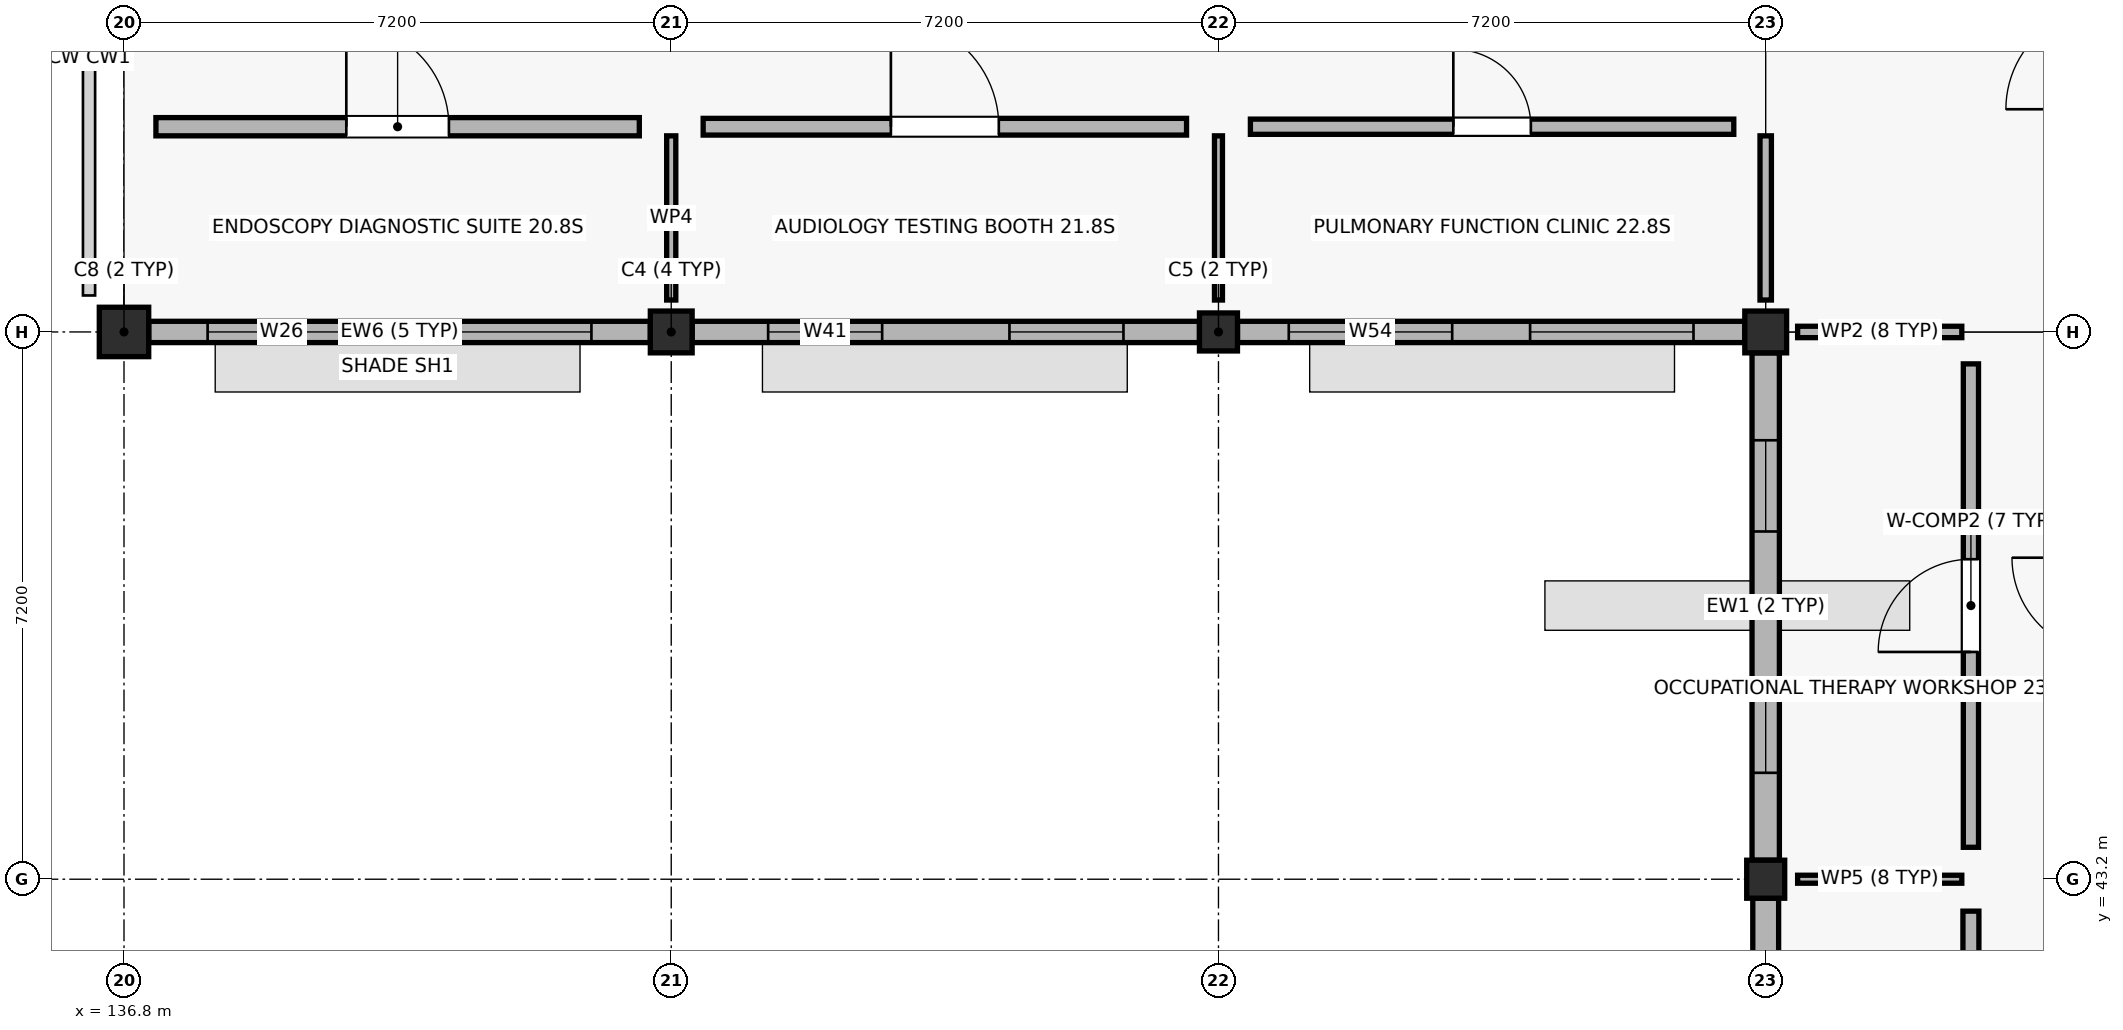
"""IFC4 building model, lengths in metres.
Left out: names, types, materials, properties, quantities, classifications, styles, units other than length and angle.
Written with IfcOpenShell. Run it as: python <this file> out.ifc"""

import sys

from ifc_helpers import new_model, si_unit, direction, frame, frame_2d, origin, origin_2d, place, context, subcontext, project, spatial, rectangle, circle, extrude, element, fill, save


model = new_model("IFC4")
c1 = context("Model", 3, precision=1e-05, world=origin(), true_north=direction((0.0, 1.0)))
c2 = subcontext(c1, "Body", "Model", "MODEL_VIEW")
j1 = project(units=[si_unit("LENGTHUNIT", "METRE"), si_unit("PLANEANGLEUNIT", "RADIAN")], contexts=[c1])
p1 = place(None, origin())
s1 = spatial("IfcSite", under=j1, at=p1, CompositionType="ELEMENT")
p2 = place(p1, origin())
s2 = spatial("IfcBuilding", under=s1, at=p2, CompositionType="ELEMENT")
p3 = place(p2, frame((0.0, 0.0, 4.5)))
s3 = spatial("IfcBuildingStorey", under=s2, at=p3, CompositionType="ELEMENT", Elevation=4.5)
p4 = place(p3, frame((136.8, 50.4, 0.0), z_axis=(0.0, 0.0, 1.0), x_axis=(1.0, 0.0, 0.0)))
e1 = element("IfcColumn", 1, at=p4, inside=s3, PredefinedType="COLUMN", context=c2, shape_type="SweptSolid", body=[
    extrude(circle(Radius=0.325, at=origin_2d()), origin(), (0.0, 0.0, 1.0), 4.5),
])
p5 = place(p3, frame((144.0, 50.4, 0.0), z_axis=(0.0, 0.0, 1.0), x_axis=(1.0, 0.0, 0.0)))
e2 = element("IfcColumn", 2, at=p5, inside=s3, PredefinedType="COLUMN", context=c2, shape_type="SweptSolid", body=[
    extrude(rectangle(XDim=0.55, YDim=0.55, at=origin_2d()), origin(), (0.0, 0.0, 1.0), 4.5),
])
for number, where, z_axis, x_axis in (
    (3, (151.2, 50.4, 0.0), (0.0, 0.0, 1.0), (1.0, 0.0, 0.0)),
    (4, (158.4, 43.2, 0.0), (0.0, 0.0, 1.0), (1.0, 0.0, 0.0)),
):
    element("IfcColumn", number, at=place(p3, frame(where, z_axis=z_axis, x_axis=x_axis)), inside=s3, PredefinedType="COLUMN", context=c2, shape_type="SweptSolid", body=[
        extrude(rectangle(XDim=0.5, YDim=0.5, at=origin_2d()), origin(), (0.0, 0.0, 1.0), 4.28),
    ])
p6 = place(p3, frame((158.4, 50.4, 0.0), z_axis=(0.0, 0.0, 1.0), x_axis=(1.0, 0.0, 0.0)))
e5 = element("IfcColumn", 5, at=p6, inside=s3, PredefinedType="COLUMN", context=c2, shape_type="SweptSolid", body=[
    extrude(rectangle(XDim=0.55, YDim=0.55, at=origin_2d()), origin(), (0.0, 0.0, 1.0), 4.28),
])
p7 = place(p3, frame((137.125, 50.4, 0.0), z_axis=(0.0, 0.0, 1.0), x_axis=(1.0, 0.0, 0.0)))
e6 = element("IfcWall", 6, at=p7, inside=s3, PredefinedType="STANDARD", context=c2, shape_type="SweptSolid", body=[
    extrude(rectangle(XDim=6.6, YDim=0.28, at=frame_2d((3.3, 0.0))), origin(), (0.0, 0.0, 1.0), 3.47),
])
p8 = place(p7, frame((0.775, 0.0, 0.9)))
e7 = element("IfcOpeningElement", 7, at=p8, cuts=e6, PredefinedType="OPENING", context=c2, shape_type="SweptSolid", body=[
    extrude(rectangle(XDim=1.95, YDim=1.5, at=frame_2d((0.975, 0.75))), frame((0.0, 0.15, 0.0), z_axis=(0.0, -1.0, 0.0), x_axis=(1.0, 0.0, 0.0)), (0.0, 0.0, 1.0), 0.3),
])
p9 = place(p7, frame((3.875, 0.0, 0.9)))
e8 = element("IfcOpeningElement", 8, at=p9, cuts=e6, PredefinedType="OPENING", context=c2, shape_type="SweptSolid", body=[
    extrude(rectangle(XDim=1.95, YDim=1.5, at=frame_2d((0.975, 0.75))), frame((0.0, 0.15, 0.0), z_axis=(0.0, -1.0, 0.0), x_axis=(1.0, 0.0, 0.0)), (0.0, 0.0, 1.0), 0.3),
])
p10 = place(p3, frame((144.275, 50.4, 0.0), z_axis=(0.0, 0.0, 1.0), x_axis=(1.0, 0.0, 0.0)))
e9 = element("IfcWall", 9, at=p10, inside=s3, PredefinedType="STANDARD", context=c2, shape_type="SweptSolid", body=[
    extrude(rectangle(XDim=6.675, YDim=0.28, at=frame_2d((3.337, 0.0))), origin(), (0.0, 0.0, 1.0), 3.47),
])
p11 = place(p10, frame((1.0, 0.0, 0.9)))
e10 = element("IfcOpeningElement", 10, at=p11, cuts=e9, PredefinedType="OPENING", context=c2, shape_type="SweptSolid", body=[
    extrude(rectangle(XDim=1.5, YDim=1.75, at=frame_2d((0.75, 0.875))), frame((0.0, 0.15, 0.0), z_axis=(0.0, -1.0, 0.0), x_axis=(1.0, 0.0, 0.0)), (0.0, 0.0, 1.0), 0.3),
])
p12 = place(p10, frame((4.175, 0.0, 0.9)))
e11 = element("IfcOpeningElement", 11, at=p12, cuts=e9, PredefinedType="OPENING", context=c2, shape_type="SweptSolid", body=[
    extrude(rectangle(XDim=1.5, YDim=1.75, at=frame_2d((0.75, 0.875))), frame((0.0, 0.15, 0.0), z_axis=(0.0, -1.0, 0.0), x_axis=(1.0, 0.0, 0.0)), (0.0, 0.0, 1.0), 0.3),
])
p13 = place(p3, frame((151.45, 50.4, 0.0), z_axis=(0.0, 0.0, 1.0), x_axis=(1.0, 0.0, 0.0)))
e12 = element("IfcWall", 12, at=p13, inside=s3, PredefinedType="STANDARD", context=c2, shape_type="SweptSolid", body=[
    extrude(rectangle(XDim=6.675, YDim=0.28, at=frame_2d((3.337, 0.0))), origin(), (0.0, 0.0, 1.0), 3.47),
])
p14 = place(p13, frame((0.675, 0.0, 0.9)))
e13 = element("IfcOpeningElement", 13, at=p14, cuts=e12, PredefinedType="OPENING", context=c2, shape_type="SweptSolid", body=[
    extrude(rectangle(XDim=2.15, YDim=1.88, at=frame_2d((1.075, 0.94))), frame((0.0, 0.15, 0.0), z_axis=(0.0, -1.0, 0.0), x_axis=(1.0, 0.0, 0.0)), (0.0, 0.0, 1.0), 0.3),
])
p15 = place(p13, frame((3.85, 0.0, 0.9)))
e14 = element("IfcOpeningElement", 14, at=p15, cuts=e12, PredefinedType="OPENING", context=c2, shape_type="SweptSolid", body=[
    extrude(rectangle(XDim=2.15, YDim=1.88, at=frame_2d((1.075, 0.94))), frame((0.0, 0.15, 0.0), z_axis=(0.0, -1.0, 0.0), x_axis=(1.0, 0.0, 0.0)), (0.0, 0.0, 1.0), 0.3),
])
p16 = place(p3, frame((158.4, 42.95, 0.0), z_axis=(0.0, 0.0, 1.0), x_axis=(0.0, -1.0, 0.0)))
e15 = element("IfcWall", 15, at=p16, inside=s3, PredefinedType="SOLIDWALL", context=c2, shape_type="SweptSolid", body=[
    extrude(rectangle(XDim=6.725, YDim=0.34, at=frame_2d((3.362, 0.0))), origin(), (0.0, 0.0, 1.0), 3.52),
])
p17 = place(p16, frame((0.85, 0.0, 0.9)))
e16 = element("IfcOpeningElement", 16, at=p17, cuts=e15, PredefinedType="OPENING", context=c2, shape_type="SweptSolid", body=[
    extrude(rectangle(XDim=1.8, YDim=1.5, at=frame_2d((0.9, 0.75))), frame((0.0, 0.18, 0.0), z_axis=(0.0, -1.0, 0.0), x_axis=(1.0, 0.0, 0.0)), (0.0, 0.0, 1.0), 0.36),
])
p18 = place(p16, frame((4.075, 0.0, 0.9)))
e17 = element("IfcOpeningElement", 17, at=p18, cuts=e15, PredefinedType="OPENING", context=c2, shape_type="SweptSolid", body=[
    extrude(rectangle(XDim=1.8, YDim=1.5, at=frame_2d((0.9, 0.75))), frame((0.0, 0.18, 0.0), z_axis=(0.0, -1.0, 0.0), x_axis=(1.0, 0.0, 0.0)), (0.0, 0.0, 1.0), 0.36),
])
p19 = place(p3, frame((158.4, 50.125, 0.0), z_axis=(0.0, 0.0, 1.0), x_axis=(0.0, -1.0, 0.0)))
e18 = element("IfcWall", 18, at=p19, inside=s3, PredefinedType="SOLIDWALL", context=c2, shape_type="SweptSolid", body=[
    extrude(rectangle(XDim=6.675, YDim=0.36, at=frame_2d((3.337, 0.0))), origin(), (0.0, 0.0, 1.0), 3.52),
])
p20 = place(p19, frame((1.15, 0.0, 0.9)))
e19 = element("IfcOpeningElement", 19, at=p20, cuts=e18, PredefinedType="OPENING", context=c2, shape_type="SweptSolid", body=[
    extrude(rectangle(XDim=1.2, YDim=1.62, at=frame_2d((0.6, 0.81))), frame((0.0, 0.19, 0.0), z_axis=(0.0, -1.0, 0.0), x_axis=(1.0, 0.0, 0.0)), (0.0, 0.0, 1.0), 0.38),
])
p21 = place(p19, frame((4.325, 0.0, 0.9)))
e20 = element("IfcOpeningElement", 20, at=p21, cuts=e18, PredefinedType="OPENING", context=c2, shape_type="SweptSolid", body=[
    extrude(rectangle(XDim=1.2, YDim=1.62, at=frame_2d((0.6, 0.81))), frame((0.0, 0.19, 0.0), z_axis=(0.0, -1.0, 0.0), x_axis=(1.0, 0.0, 0.0)), (0.0, 0.0, 1.0), 0.38),
])
p22 = place(p3, frame((161.1, 36.42, 0.0), z_axis=(0.0, 0.0, 1.0), x_axis=(0.0, 1.0, 0.0)))
e21 = element("IfcWall", 21, at=p22, inside=s3, PredefinedType="PLUMBINGWALL", context=c2, shape_type="SweptSolid", body=[
    extrude(rectangle(XDim=6.36, YDim=0.21, at=frame_2d((3.18, 0.0))), origin(), (0.0, 0.0, 1.0), 3.36),
])
p23 = place(p22, frame((2.61, 0.0, 0.0)))
e22 = element("IfcOpeningElement", 22, at=p23, cuts=e21, PredefinedType="OPENING", context=c2, shape_type="SweptSolid", body=[
    extrude(rectangle(XDim=1.14, YDim=2.14, at=frame_2d((0.57, 1.07))), frame((0.0, 0.115, 0.0), z_axis=(0.0, -1.0, 0.0), x_axis=(1.0, 0.0, 0.0)), (0.0, 0.0, 1.0), 0.23),
])
p24 = place(p3, frame((158.82, 43.2, 0.0), z_axis=(0.0, 0.0, 1.0), x_axis=(1.0, 0.0, 0.0)))
e23 = element("IfcWall", 23, at=p24, inside=s3, PredefinedType="PARTITIONING", context=c2, shape_type="SweptSolid", body=[
    extrude(rectangle(XDim=2.16, YDim=0.105, at=frame_2d((1.08, 0.0))), origin(), (0.0, 0.0, 1.0), 3.36),
])
p25 = place(p3, frame((161.1, 43.62, 0.0), z_axis=(0.0, 0.0, 1.0), x_axis=(0.0, 1.0, 0.0)))
e24 = element("IfcWall", 24, at=p25, inside=s3, PredefinedType="SOLIDWALL", context=c2, shape_type="SweptSolid", body=[
    extrude(rectangle(XDim=6.36, YDim=0.2, at=frame_2d((3.18, 0.0))), origin(), (0.0, 0.0, 1.0), 3.36),
])
p26 = place(p25, frame((2.57, 0.0, 0.0)))
e25 = element("IfcOpeningElement", 25, at=p26, cuts=e24, PredefinedType="OPENING", context=c2, shape_type="SweptSolid", body=[
    extrude(rectangle(XDim=1.22, YDim=2.14, at=frame_2d((0.61, 1.07))), frame((0.0, 0.11, 0.0), z_axis=(0.0, -1.0, 0.0), x_axis=(1.0, 0.0, 0.0)), (0.0, 0.0, 1.0), 0.22),
])
p27 = place(p3, frame((158.82, 50.4, 0.0), z_axis=(0.0, 0.0, 1.0), x_axis=(1.0, 0.0, 0.0)))
e26 = element("IfcWall", 26, at=p27, inside=s3, PredefinedType="PARTITIONING", context=c2, shape_type="SweptSolid", body=[
    extrude(rectangle(XDim=2.16, YDim=0.15, at=frame_2d((1.08, 0.0))), origin(), (0.0, 0.0, 1.0), 3.36),
])
p28 = place(p3, frame((137.22, 53.1, 0.0), z_axis=(0.0, 0.0, 1.0), x_axis=(1.0, 0.0, 0.0)))
e27 = element("IfcWall", 27, at=p28, inside=s3, PredefinedType="SOLIDWALL", context=c2, shape_type="SweptSolid", body=[
    extrude(rectangle(XDim=6.36, YDim=0.24, at=frame_2d((3.18, 0.0))), origin(), (0.0, 0.0, 1.0), 3.36),
])
p29 = place(p28, frame((2.505, 0.0, 0.0)))
e28 = element("IfcOpeningElement", 28, at=p29, cuts=e27, PredefinedType="OPENING", context=c2, shape_type="SweptSolid", body=[
    extrude(rectangle(XDim=1.35, YDim=2.2, at=frame_2d((0.675, 1.1))), frame((0.0, 0.13, 0.0), z_axis=(0.0, -1.0, 0.0), x_axis=(1.0, 0.0, 0.0)), (0.0, 0.0, 1.0), 0.26),
])
p30 = place(p3, frame((144.0, 50.82, 0.0), z_axis=(0.0, 0.0, 1.0), x_axis=(0.0, 1.0, 0.0)))
e29 = element("IfcWall", 29, at=p30, inside=s3, PredefinedType="PARTITIONING", context=c2, shape_type="SweptSolid", body=[
    extrude(rectangle(XDim=2.16, YDim=0.12, at=frame_2d((1.08, 0.0))), origin(), (0.0, 0.0, 1.0), 3.36),
])
p31 = place(p3, frame((144.42, 53.1, 0.0), z_axis=(0.0, 0.0, 1.0), x_axis=(1.0, 0.0, 0.0)))
e30 = element("IfcWall", 30, at=p31, inside=s3, PredefinedType="SOLIDWALL", context=c2, shape_type="SweptSolid", body=[
    extrude(rectangle(XDim=6.36, YDim=0.22, at=frame_2d((3.18, 0.0))), origin(), (0.0, 0.0, 1.0), 3.36),
])
p32 = place(p31, frame((2.47, 0.0, 0.0)))
e31 = element("IfcOpeningElement", 31, at=p32, cuts=e30, PredefinedType="OPENING", context=c2, shape_type="SweptSolid", body=[
    extrude(rectangle(XDim=1.42, YDim=2.14, at=frame_2d((0.71, 1.07))), frame((0.0, 0.12, 0.0), z_axis=(0.0, -1.0, 0.0), x_axis=(1.0, 0.0, 0.0)), (0.0, 0.0, 1.0), 0.24),
])
p33 = place(p3, frame((151.2, 50.82, 0.0), z_axis=(0.0, 0.0, 1.0), x_axis=(0.0, 1.0, 0.0)))
e32 = element("IfcWall", 32, at=p33, inside=s3, PredefinedType="PARTITIONING", context=c2, shape_type="SweptSolid", body=[
    extrude(rectangle(XDim=2.16, YDim=0.105, at=frame_2d((1.08, 0.0))), origin(), (0.0, 0.0, 1.0), 3.36),
])
p34 = place(p3, frame((151.62, 53.1, 0.0), z_axis=(0.0, 0.0, 1.0), x_axis=(1.0, 0.0, 0.0)))
e33 = element("IfcWall", 33, at=p34, inside=s3, PredefinedType="SOLIDWALL", context=c2, shape_type="SweptSolid", body=[
    extrude(rectangle(XDim=6.36, YDim=0.2, at=frame_2d((3.18, 0.0))), origin(), (0.0, 0.0, 1.0), 3.36),
])
p35 = place(p34, frame((2.67, 0.0, 0.0)))
e34 = element("IfcOpeningElement", 34, at=p35, cuts=e33, PredefinedType="OPENING", context=c2, shape_type="SweptSolid", body=[
    extrude(rectangle(XDim=1.02, YDim=2.19, at=frame_2d((0.51, 1.095))), frame((0.0, 0.11, 0.0), z_axis=(0.0, -1.0, 0.0), x_axis=(1.0, 0.0, 0.0)), (0.0, 0.0, 1.0), 0.22),
])
p36 = place(p3, frame((158.4, 50.82, 0.0), z_axis=(0.0, 0.0, 1.0), x_axis=(0.0, 1.0, 0.0)))
e35 = element("IfcWall", 35, at=p36, inside=s3, PredefinedType="PARTITIONING", context=c2, shape_type="SweptSolid", body=[
    extrude(rectangle(XDim=2.16, YDim=0.15, at=frame_2d((1.08, 0.0))), origin(), (0.0, 0.0, 1.0), 3.36),
])
p37 = place(p8, origin())
e36 = element("IfcWindow", 36, at=p37, inside=s3, PartitioningType="SINGLE_PANEL", PredefinedType="WINDOW", context=c2, shape_type="SweptSolid", body=[
    extrude(rectangle(XDim=1.95, YDim=1.5, at=frame_2d((0.975, 0.75))), frame((0.0, 0.03, 0.0), z_axis=(0.0, -1.0, 0.0), x_axis=(1.0, 0.0, 0.0)), (0.0, 0.0, 1.0), 0.06),
])
fill(e7, e36)
p38 = place(p9, origin())
e37 = element("IfcWindow", 37, at=p38, inside=s3, PartitioningType="SINGLE_PANEL", PredefinedType="WINDOW", context=c2, shape_type="SweptSolid", body=[
    extrude(rectangle(XDim=1.95, YDim=1.5, at=frame_2d((0.975, 0.75))), frame((0.0, 0.03, 0.0), z_axis=(0.0, -1.0, 0.0), x_axis=(1.0, 0.0, 0.0)), (0.0, 0.0, 1.0), 0.06),
])
fill(e8, e37)
p39 = place(p11, origin())
e38 = element("IfcWindow", 38, at=p39, inside=s3, PartitioningType="SINGLE_PANEL", PredefinedType="WINDOW", context=c2, shape_type="SweptSolid", body=[
    extrude(rectangle(XDim=1.5, YDim=1.75, at=frame_2d((0.75, 0.875))), frame((0.0, 0.03, 0.0), z_axis=(0.0, -1.0, 0.0), x_axis=(1.0, 0.0, 0.0)), (0.0, 0.0, 1.0), 0.06),
])
fill(e10, e38)
p40 = place(p12, origin())
e39 = element("IfcWindow", 39, at=p40, inside=s3, PartitioningType="SINGLE_PANEL", PredefinedType="WINDOW", context=c2, shape_type="SweptSolid", body=[
    extrude(rectangle(XDim=1.5, YDim=1.75, at=frame_2d((0.75, 0.875))), frame((0.0, 0.03, 0.0), z_axis=(0.0, -1.0, 0.0), x_axis=(1.0, 0.0, 0.0)), (0.0, 0.0, 1.0), 0.06),
])
fill(e11, e39)
p41 = place(p14, origin())
e40 = element("IfcWindow", 40, at=p41, inside=s3, PartitioningType="SINGLE_PANEL", PredefinedType="WINDOW", context=c2, shape_type="SweptSolid", body=[
    extrude(rectangle(XDim=2.15, YDim=1.88, at=frame_2d((1.075, 0.94))), frame((0.0, 0.03, 0.0), z_axis=(0.0, -1.0, 0.0), x_axis=(1.0, 0.0, 0.0)), (0.0, 0.0, 1.0), 0.06),
])
fill(e13, e40)
p42 = place(p15, origin())
e41 = element("IfcWindow", 41, at=p42, inside=s3, PartitioningType="SINGLE_PANEL", PredefinedType="WINDOW", context=c2, shape_type="SweptSolid", body=[
    extrude(rectangle(XDim=2.15, YDim=1.88, at=frame_2d((1.075, 0.94))), frame((0.0, 0.03, 0.0), z_axis=(0.0, -1.0, 0.0), x_axis=(1.0, 0.0, 0.0)), (0.0, 0.0, 1.0), 0.06),
])
fill(e14, e41)
p43 = place(p20, origin())
e42 = element("IfcWindow", 42, at=p43, inside=s3, PartitioningType="SINGLE_PANEL", PredefinedType="WINDOW", context=c2, shape_type="SweptSolid", body=[
    extrude(rectangle(XDim=1.2, YDim=1.62, at=frame_2d((0.6, 0.81))), frame((0.0, 0.03, 0.0), z_axis=(0.0, -1.0, 0.0), x_axis=(1.0, 0.0, 0.0)), (0.0, 0.0, 1.0), 0.06),
])
fill(e19, e42)
p44 = place(p21, origin())
e43 = element("IfcWindow", 43, at=p44, inside=s3, PartitioningType="SINGLE_PANEL", PredefinedType="WINDOW", context=c2, shape_type="SweptSolid", body=[
    extrude(rectangle(XDim=1.2, YDim=1.62, at=frame_2d((0.6, 0.81))), frame((0.0, 0.03, 0.0), z_axis=(0.0, -1.0, 0.0), x_axis=(1.0, 0.0, 0.0)), (0.0, 0.0, 1.0), 0.06),
])
fill(e20, e43)
p45 = place(p26, origin())
e44 = element("IfcDoor", 44, at=p45, inside=s3, OperationType="SINGLE_SWING_LEFT", PredefinedType="DOOR", context=c2, shape_type="SweptSolid", body=[
    extrude(rectangle(XDim=1.22, YDim=2.14, at=frame_2d((0.61, 1.07))), frame((0.0, 0.025, 0.0), z_axis=(0.0, -1.0, 0.0), x_axis=(1.0, 0.0, 0.0)), (0.0, 0.0, 1.0), 0.05),
])
fill(e25, e44)
p46 = place(p29, origin())
e45 = element("IfcDoor", 45, at=p46, inside=s3, OperationType="SINGLE_SWING_LEFT", PredefinedType="DOOR", context=c2, shape_type="SweptSolid", body=[
    extrude(rectangle(XDim=1.35, YDim=2.2, at=frame_2d((0.675, 1.1))), frame((0.0, 0.025, 0.0), z_axis=(0.0, -1.0, 0.0), x_axis=(1.0, 0.0, 0.0)), (0.0, 0.0, 1.0), 0.05),
])
fill(e28, e45)
p47 = place(p32, origin())
e46 = element("IfcDoor", 46, at=p47, inside=s3, OperationType="SINGLE_SWING_LEFT", PredefinedType="DOOR", context=c2, shape_type="SweptSolid", body=[
    extrude(rectangle(XDim=1.42, YDim=2.14, at=frame_2d((0.71, 1.07))), frame((0.0, 0.025, 0.0), z_axis=(0.0, -1.0, 0.0), x_axis=(1.0, 0.0, 0.0)), (0.0, 0.0, 1.0), 0.05),
])
fill(e31, e46)
p48 = place(p35, origin())
e47 = element("IfcDoor", 47, at=p48, inside=s3, OperationType="SINGLE_SWING_LEFT", PredefinedType="DOOR", context=c2, shape_type="SweptSolid", body=[
    extrude(rectangle(XDim=1.02, YDim=2.19, at=frame_2d((0.51, 1.095))), frame((0.0, 0.025, 0.0), z_axis=(0.0, -1.0, 0.0), x_axis=(1.0, 0.0, 0.0)), (0.0, 0.0, 1.0), 0.05),
])
fill(e34, e47)
save(model, sys.argv[1])
